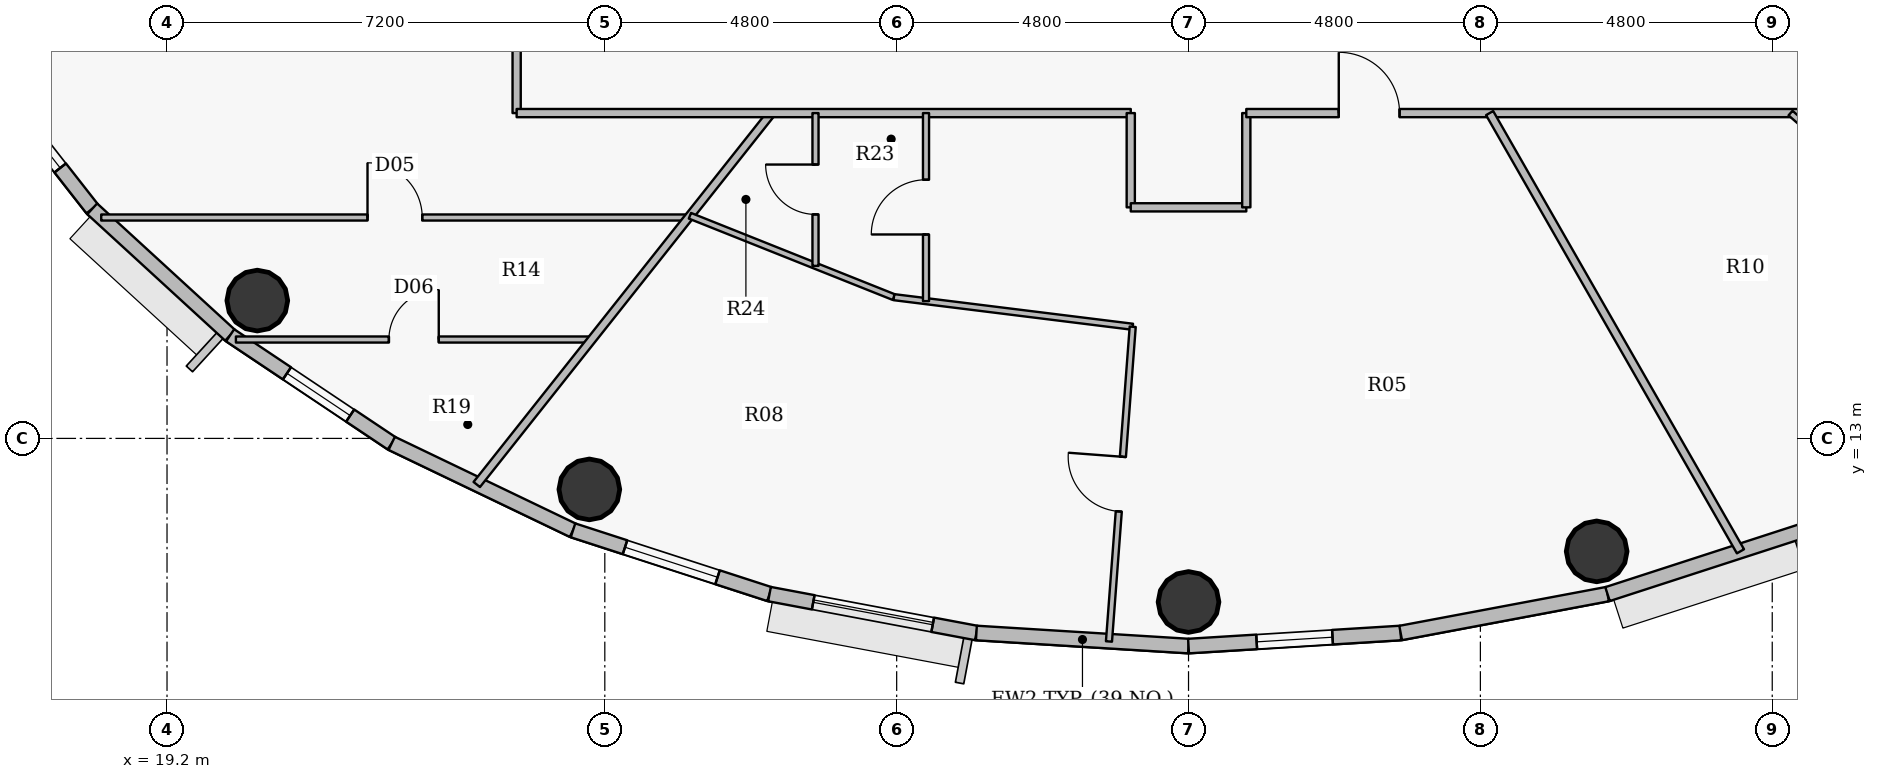
"""IFC4 building model, lengths in metres.
Left out: names, types, materials, properties, quantities, classifications, styles, units other than length and angle.
Written with IfcOpenShell. Run it as: python <this file> out.ifc"""

import sys

from ifc_helpers import new_model, si_unit, direction, frame, frame_2d, origin, origin_2d, place, context, subcontext, project, spatial, rectangle, hollow_circle, extrude, source, transform, mapped, element, fill, save


model = new_model("IFC4")
c1 = context("Model", 3, precision=1e-05, world=origin(), true_north=direction((0.0, 1.0)))
c2 = subcontext(c1, "Body", "Model", "MODEL_VIEW")
j1 = project(units=[si_unit("LENGTHUNIT", "METRE"), si_unit("PLANEANGLEUNIT", "RADIAN")], contexts=[c1])
p1 = place(None, origin())
s1 = spatial("IfcSite", under=j1, at=p1, CompositionType="ELEMENT")
p2 = place(p1, origin())
s2 = spatial("IfcBuilding", under=s1, at=p2, CompositionType="ELEMENT")
p3 = place(p2, frame((0.0, 0.0, 276.75)))
s3 = spatial("IfcBuildingStorey", under=s2, at=p3, CompositionType="ELEMENT", Elevation=276.75)
for number, where, z_axis, x_axis in (
    (1, (20.685, 15.267, 0.0), (0.0, 0.0, 1.0), (1.0, 0.0, 0.0)),
    (2, (26.146, 12.161, 0.0), (0.0, 0.0, 1.0), (1.0, 0.0, 0.0)),
    (3, (36.0, 10.31, 0.0), (0.0, 0.0, 1.0), (1.0, 0.0, 0.0)),
    (4, (42.712, 11.142, 0.0), (0.0, 0.0, 1.0), (1.0, 0.0, 0.0)),
):
    element("IfcColumn", number, at=place(p3, frame(where, z_axis=z_axis, x_axis=x_axis)), inside=s3, PredefinedType="COLUMN", context=c2, shape_type="SweptSolid", body=[
        extrude(hollow_circle(Radius=0.5, WallThickness=0.032, at=origin_2d()), origin(), (0.0, 0.0, 1.0), 3.75),
    ])
p4 = place(p3, frame((17.97, 16.775, 0.0), z_axis=(0.0, 0.0, 1.0), x_axis=(-0.616337186556, 0.787482363275, 0.0)))
e5 = element("IfcWall", 5, at=p4, inside=s3, PredefinedType="SOLIDWALL", context=c2, shape_type="SweptSolid", body=[
    extrude(rectangle(XDim=2.958, YDim=0.24, at=frame_2d((1.479, 0.0))), origin(), (0.0, 0.0, 1.0), 3.5),
])
p5 = place(p4, frame((0.854, 0.0, 0.9)))
e6 = element("IfcOpeningElement", 6, at=p5, cuts=e5, PredefinedType="OPENING", context=c2, shape_type="SweptSolid", body=[
    extrude(rectangle(XDim=1.25, YDim=1.65, at=origin_2d()), frame((0.625, 0.13, 0.825), z_axis=(0.0, -1.0, 0.0), x_axis=(1.0, 0.0, 0.0)), (0.0, 0.0, 1.0), 0.26),
])
p6 = place(p3, frame((20.238, 14.696, 0.0), z_axis=(0.0, 0.0, 1.0), x_axis=(-0.737068506972, 0.675818034703, 0.0)))
e7 = element("IfcWall", 7, at=p6, inside=s3, PredefinedType="SOLIDWALL", context=c2, shape_type="SweptSolid", body=[
    extrude(rectangle(XDim=3.077, YDim=0.24, at=frame_2d((1.539, 0.0))), origin(), (0.0, 0.0, 1.0), 3.5),
])
p7 = place(p3, frame((22.896, 12.918, 0.0), z_axis=(0.0, 0.0, 1.0), x_axis=(-0.831250592635, 0.55589787933, 0.0)))
e8 = element("IfcWall", 8, at=p7, inside=s3, PredefinedType="SOLIDWALL", context=c2, shape_type="SweptSolid", body=[
    extrude(rectangle(XDim=3.197, YDim=0.24, at=frame_2d((1.599, 0.0))), origin(), (0.0, 0.0, 1.0), 3.5),
])
p8 = place(p7, frame((0.822, 0.0, 0.9)))
e9 = element("IfcOpeningElement", 9, at=p8, cuts=e8, PredefinedType="OPENING", context=c2, shape_type="SweptSolid", body=[
    extrude(rectangle(XDim=1.25, YDim=1.65, at=origin_2d()), frame((0.625, 0.13, 0.825), z_axis=(0.0, -1.0, 0.0), x_axis=(1.0, 0.0, 0.0)), (0.0, 0.0, 1.0), 0.26),
])
p9 = place(p3, frame((25.877, 11.488, 0.0), z_axis=(0.0, 0.0, 1.0), x_axis=(-0.901573741254, 0.43262546051, 0.0)))
e10 = element("IfcWall", 10, at=p9, inside=s3, PredefinedType="SOLIDWALL", context=c2, shape_type="SweptSolid", body=[
    extrude(rectangle(XDim=3.307, YDim=0.24, at=frame_2d((1.653, 0.0))), origin(), (0.0, 0.0, 1.0), 3.5),
])
p10 = place(p3, frame((29.109, 10.44, 0.0), z_axis=(0.0, 0.0, 1.0), x_axis=(-0.95123136723, 0.308478339592, 0.0)))
e11 = element("IfcWall", 11, at=p10, inside=s3, PredefinedType="SOLIDWALL", context=c2, shape_type="SweptSolid", body=[
    extrude(rectangle(XDim=3.398, YDim=0.24, at=frame_2d((1.699, 0.0))), origin(), (0.0, 0.0, 1.0), 3.5),
])
p11 = place(p10, frame((0.899, 0.0, 0.9)))
e12 = element("IfcOpeningElement", 12, at=p11, cuts=e11, PredefinedType="OPENING", context=c2, shape_type="SweptSolid", body=[
    extrude(rectangle(XDim=1.6, YDim=1.75, at=origin_2d()), frame((0.8, 0.13, 0.875), z_axis=(0.0, -1.0, 0.0), x_axis=(1.0, 0.0, 0.0)), (0.0, 0.0, 1.0), 0.26),
])
p12 = place(p3, frame((32.511, 9.8, 0.0), z_axis=(0.0, 0.0, 1.0), x_axis=(-0.982782655757, 0.184765395959, 0.0)))
e13 = element("IfcWall", 13, at=p12, inside=s3, PredefinedType="SOLIDWALL", context=c2, shape_type="SweptSolid", body=[
    extrude(rectangle(XDim=3.462, YDim=0.24, at=frame_2d((1.731, 0.0))), origin(), (0.0, 0.0, 1.0), 3.5),
])
p13 = place(p12, frame((0.731, 0.0, 0.9)))
e14 = element("IfcOpeningElement", 14, at=p13, cuts=e13, PredefinedType="OPENING", context=c2, shape_type="SweptSolid", body=[
    extrude(rectangle(XDim=2.0, YDim=1.75, at=origin_2d()), frame((1.0, 0.13, 0.875), z_axis=(0.0, -1.0, 0.0), x_axis=(1.0, 0.0, 0.0)), (0.0, 0.0, 1.0), 0.26),
])
p14 = place(p3, frame((36.0, 9.585, 0.0), z_axis=(0.0, 0.0, 1.0), x_axis=(-0.998104946479, 0.061534671648, 0.0)))
e15 = element("IfcWall", 15, at=p14, inside=s3, PredefinedType="SOLIDWALL", context=c2, shape_type="SweptSolid", body=[
    extrude(rectangle(XDim=3.495, YDim=0.24, at=frame_2d((1.748, 0.0))), origin(), (0.0, 0.0, 1.0), 3.5),
])
p15 = place(p3, frame((39.489, 9.8, 0.0), z_axis=(0.0, 0.0, 1.0), x_axis=(-0.998104946479, -0.061534671648, 0.0)))
e16 = element("IfcWall", 16, at=p15, inside=s3, PredefinedType="SOLIDWALL", context=c2, shape_type="SweptSolid", body=[
    extrude(rectangle(XDim=3.495, YDim=0.24, at=frame_2d((1.748, 0.0))), origin(), (0.0, 0.0, 1.0), 3.5),
])
p16 = place(p15, frame((1.123, 0.0, 0.9)))
e17 = element("IfcOpeningElement", 17, at=p16, cuts=e16, PredefinedType="OPENING", context=c2, shape_type="SweptSolid", body=[
    extrude(rectangle(XDim=1.25, YDim=1.65, at=origin_2d()), frame((0.625, 0.13, 0.825), z_axis=(0.0, -1.0, 0.0), x_axis=(1.0, 0.0, 0.0)), (0.0, 0.0, 1.0), 0.26),
])
p17 = place(p3, frame((42.891, 10.44, 0.0), z_axis=(0.0, 0.0, 1.0), x_axis=(-0.982782655757, -0.184765395959, 0.0)))
e18 = element("IfcWall", 18, at=p17, inside=s3, PredefinedType="SOLIDWALL", context=c2, shape_type="SweptSolid", body=[
    extrude(rectangle(XDim=3.462, YDim=0.24, at=frame_2d((1.731, 0.0))), origin(), (0.0, 0.0, 1.0), 3.5),
])
p18 = place(p3, frame((46.123, 11.488, 0.0), z_axis=(0.0, 0.0, 1.0), x_axis=(-0.95123136723, -0.308478339592, 0.0)))
e19 = element("IfcWall", 19, at=p18, inside=s3, PredefinedType="SOLIDWALL", context=c2, shape_type="SweptSolid", body=[
    extrude(rectangle(XDim=3.398, YDim=0.24, at=frame_2d((1.699, 0.0))), origin(), (0.0, 0.0, 1.0), 3.5),
])
p19 = place(p3, frame((18.118, 16.633, 0.0), z_axis=(0.0, 0.0, 1.0), x_axis=(1.0, 0.0, 0.0)))
e20 = element("IfcWall", 20, at=p19, inside=s3, PredefinedType="PARTITIONING", context=c2, shape_type="SweptSolid", body=[
    extrude(rectangle(XDim=9.659, YDim=0.1, at=frame_2d((4.83, 0.0))), origin(), (0.0, 0.0, 1.0), 2.985),
])
p20 = place(p19, frame((4.379, 0.0, 0.0)))
e21 = element("IfcOpeningElement", 21, at=p20, cuts=e20, PredefinedType="OPENING", context=c2, shape_type="SweptSolid", body=[
    extrude(rectangle(XDim=0.9, YDim=2.1, at=origin_2d()), frame((0.45, 0.06, 1.05), z_axis=(0.0, -1.0, 0.0), x_axis=(1.0, 0.0, 0.0)), (0.0, 0.0, 1.0), 0.12),
])
p21 = place(p3, frame((20.333, 14.626, 0.0), z_axis=(0.0, 0.0, 1.0), x_axis=(1.0, 0.0, 0.0)))
e22 = element("IfcWall", 22, at=p21, inside=s3, PredefinedType="PARTITIONING", context=c2, shape_type="SweptSolid", body=[
    extrude(rectangle(XDim=5.852, YDim=0.1, at=frame_2d((2.926, 0.0))), origin(), (0.0, 0.0, 1.0), 2.985),
])
p22 = place(p21, frame((2.516, 0.0, 0.0)))
e23 = element("IfcOpeningElement", 23, at=p22, cuts=e22, PredefinedType="OPENING", context=c2, shape_type="SweptSolid", body=[
    extrude(rectangle(XDim=0.82, YDim=2.1, at=origin_2d()), frame((0.41, 0.06, 1.05), z_axis=(0.0, -1.0, 0.0), x_axis=(1.0, 0.0, 0.0)), (0.0, 0.0, 1.0), 0.12),
])
p23 = place(p3, frame((24.294, 12.242, 0.0), z_axis=(0.0, 0.0, 1.0), x_axis=(0.621439784824, 0.783461928774, 0.0)))
e24 = element("IfcWall", 24, at=p23, inside=s3, PredefinedType="PARTITIONING", context=c2, shape_type="SweptSolid", body=[
    extrude(rectangle(XDim=7.796, YDim=0.135, at=frame_2d((3.898, 0.0))), origin(), (0.0, 0.0, 1.0), 2.985),
])
p24 = place(p3, frame((24.95, 18.35, 0.0), z_axis=(0.0, 0.0, 1.0), x_axis=(0.0, 1.0, 0.0)))
e25 = element("IfcWall", 25, at=p24, inside=s3, PredefinedType="PARTITIONING", context=c2, shape_type="SweptSolid", body=[
    extrude(rectangle(XDim=17.3, YDim=0.135, at=frame_2d((8.65, 0.0))), origin(), (0.0, 0.0, 1.0), 3.035),
])
p25 = place(p24, frame((5.495, 0.0, 0.0)))
e26 = element("IfcOpeningElement", 26, at=p25, cuts=e25, PredefinedType="OPENING", context=c2, shape_type="SweptSolid", body=[
    extrude(rectangle(XDim=1.0, YDim=2.15, at=origin_2d()), frame((0.5, 0.078, 1.075), z_axis=(0.0, -1.0, 0.0), x_axis=(1.0, 0.0, 0.0)), (0.0, 0.0, 1.0), 0.155),
])
p26 = place(p3, frame((24.95, 18.35, 0.0), z_axis=(0.0, 0.0, 1.0), x_axis=(1.0, 0.0, 0.0)))
e27 = element("IfcWall", 27, at=p26, inside=s3, PredefinedType="PARTITIONING", context=c2, shape_type="SweptSolid", body=[
    extrude(rectangle(XDim=10.1, YDim=0.135, at=frame_2d((5.05, 0.0))), origin(), (0.0, 0.0, 1.0), 3.035),
])
p27 = place(p3, frame((27.8, 16.662, 0.0), z_axis=(0.0, 0.0, 1.0), x_axis=(0.928783988526, -0.370621508628, 0.0)))
e28 = element("IfcWall", 28, at=p27, inside=s3, PredefinedType="PARTITIONING", context=c2, shape_type="SweptSolid", body=[
    extrude(rectangle(XDim=3.613, YDim=0.1, at=frame_2d((1.806, 0.0))), origin(), (0.0, 0.0, 1.0), 3.035),
])
p28 = place(p3, frame((29.865, 15.837, 0.0), z_axis=(0.0, 0.0, 1.0), x_axis=(0.0, 1.0, 0.0)))
e29 = element("IfcWall", 29, at=p28, inside=s3, PredefinedType="PARTITIONING", context=c2, shape_type="SweptSolid", body=[
    extrude(rectangle(XDim=2.513, YDim=0.1, at=frame_2d((1.256, 0.0))), origin(), (0.0, 0.0, 1.0), 3.035),
])
p29 = place(p28, frame((0.846, 0.0, 0.0)))
e30 = element("IfcOpeningElement", 30, at=p29, cuts=e29, PredefinedType="OPENING", context=c2, shape_type="SweptSolid", body=[
    extrude(rectangle(XDim=0.82, YDim=2.1, at=origin_2d()), frame((0.41, 0.06, 1.05), z_axis=(0.0, -1.0, 0.0), x_axis=(1.0, 0.0, 0.0)), (0.0, 0.0, 1.0), 0.12),
])
p30 = place(p3, frame((31.155, 15.323, 0.0), z_axis=(0.0, 0.0, 1.0), x_axis=(0.992397939869, -0.123070422704, 0.0)))
e31 = element("IfcWall", 31, at=p30, inside=s3, PredefinedType="PARTITIONING", context=c2, shape_type="SweptSolid", body=[
    extrude(rectangle(XDim=3.958, YDim=0.1, at=frame_2d((1.979, 0.0))), origin(), (0.0, 0.0, 1.0), 3.5),
])
p31 = place(p3, frame((31.683, 15.258, 0.0), z_axis=(0.0, 0.0, 1.0), x_axis=(0.0, 1.0, 0.0)))
e32 = element("IfcWall", 32, at=p31, inside=s3, PredefinedType="PARTITIONING", context=c2, shape_type="SweptSolid", body=[
    extrude(rectangle(XDim=3.093, YDim=0.1, at=frame_2d((1.546, 0.0))), origin(), (0.0, 0.0, 1.0), 3.5),
])
p32 = place(p31, frame((1.096, 0.0, 0.0)))
e33 = element("IfcOpeningElement", 33, at=p32, cuts=e32, PredefinedType="OPENING", context=c2, shape_type="SweptSolid", body=[
    extrude(rectangle(XDim=0.9, YDim=2.1, at=origin_2d()), frame((0.45, 0.06, 1.05), z_axis=(0.0, -1.0, 0.0), x_axis=(1.0, 0.0, 0.0)), (0.0, 0.0, 1.0), 0.12),
])
p33 = place(p3, frame((34.691, 9.661, 0.0), z_axis=(0.0, 0.0, 1.0), x_axis=(0.0752647297, 0.997163587614, 0.0)))
e34 = element("IfcWall", 34, at=p33, inside=s3, PredefinedType="PARTITIONING", context=c2, shape_type="SweptSolid", body=[
    extrude(rectangle(XDim=5.19, YDim=0.1, at=frame_2d((2.595, 0.0))), origin(), (0.0, 0.0, 1.0), 2.985),
])
p34 = place(p33, frame((2.145, 0.0, 0.0)))
e35 = element("IfcOpeningElement", 35, at=p34, cuts=e34, PredefinedType="OPENING", context=c2, shape_type="SweptSolid", body=[
    extrude(rectangle(XDim=0.9, YDim=2.1, at=origin_2d()), frame((0.45, 0.06, 1.05), z_axis=(0.0, -1.0, 0.0), x_axis=(1.0, 0.0, 0.0)), (0.0, 0.0, 1.0), 0.12),
])
p35 = place(p3, frame((35.05, 16.8, 0.0), z_axis=(0.0, 0.0, 1.0), x_axis=(0.0, 1.0, 0.0)))
e36 = element("IfcWall", 36, at=p35, inside=s3, PredefinedType="PARTITIONING", context=c2, shape_type="SweptSolid", body=[
    extrude(rectangle(XDim=1.55, YDim=0.135, at=frame_2d((0.775, 0.0))), origin(), (0.0, 0.0, 1.0), 3.5),
])
p36 = place(p3, frame((35.05, 16.8, 0.0), z_axis=(0.0, 0.0, 1.0), x_axis=(1.0, 0.0, 0.0)))
e37 = element("IfcWall", 37, at=p36, inside=s3, PredefinedType="PARTITIONING", context=c2, shape_type="SweptSolid", body=[
    extrude(rectangle(XDim=1.9, YDim=0.135, at=frame_2d((0.95, 0.0))), origin(), (0.0, 0.0, 1.0), 3.035),
])
p37 = place(p3, frame((36.95, 16.8, 0.0), z_axis=(0.0, 0.0, 1.0), x_axis=(0.0, 1.0, 0.0)))
e38 = element("IfcWall", 38, at=p37, inside=s3, PredefinedType="PARTITIONING", context=c2, shape_type="SweptSolid", body=[
    extrude(rectangle(XDim=1.55, YDim=0.135, at=frame_2d((0.775, 0.0))), origin(), (0.0, 0.0, 1.0), 3.5),
])
p38 = place(p3, frame((36.95, 18.35, 0.0), z_axis=(0.0, 0.0, 1.0), x_axis=(1.0, 0.0, 0.0)))
e39 = element("IfcWall", 39, at=p38, inside=s3, PredefinedType="PARTITIONING", context=c2, shape_type="SweptSolid", body=[
    extrude(rectangle(XDim=10.1, YDim=0.135, at=frame_2d((5.05, 0.0))), origin(), (0.0, 0.0, 1.0), 3.035),
])
p39 = place(p38, frame((1.521, 0.0, 0.0)))
e40 = element("IfcOpeningElement", 40, at=p39, cuts=e39, PredefinedType="OPENING", context=c2, shape_type="SweptSolid", body=[
    extrude(rectangle(XDim=1.0, YDim=2.15, at=origin_2d()), frame((0.5, 0.078, 1.075), z_axis=(0.0, -1.0, 0.0), x_axis=(1.0, 0.0, 0.0)), (0.0, 0.0, 1.0), 0.155),
])
p40 = place(p3, frame((40.952, 18.35, 0.0), z_axis=(0.0, 0.0, 1.0), x_axis=(0.496803688517, -0.867862947173, 0.0)))
e41 = element("IfcWall", 41, at=p40, inside=s3, PredefinedType="PARTITIONING", context=c2, shape_type="SweptSolid", body=[
    extrude(rectangle(XDim=8.304, YDim=0.135, at=frame_2d((4.152, 0.0))), origin(), (0.0, 0.0, 1.0), 2.985),
])
p41 = place(p3, frame((45.901, 18.35, 0.0), z_axis=(0.0, 0.0, 1.0), x_axis=(0.753056223084, -0.657956172457, 0.0)))
e42 = element("IfcWall", 42, at=p41, inside=s3, PredefinedType="PARTITIONING", context=c2, shape_type="SweptSolid", body=[
    extrude(rectangle(XDim=6.526, YDim=0.1, at=frame_2d((3.263, 0.0))), origin(), (0.0, 0.0, 1.0), 2.985),
])
p42 = place(p41, frame((2.813, 0.0, 0.0)))
e43 = element("IfcOpeningElement", 43, at=p42, cuts=e42, PredefinedType="OPENING", context=c2, shape_type="SweptSolid", body=[
    extrude(rectangle(XDim=0.9, YDim=2.1, at=origin_2d()), frame((0.45, 0.06, 1.05), z_axis=(0.0, -1.0, 0.0), x_axis=(1.0, 0.0, 0.0)), (0.0, 0.0, 1.0), 0.12),
])
m1 = source(origin(), c2, "Body", "SweptSolid", [
    extrude(rectangle(XDim=1.25, YDim=1.65, at=origin_2d()), frame((0.625, 0.03, 0.825), z_axis=(0.0, -1.0, 0.0), x_axis=(1.0, 0.0, 0.0)), (0.0, 0.0, 1.0), 0.06),
])
p43 = place(p5, origin())
e44 = element("IfcWindow", 44, at=p43, inside=s3, PartitioningType="SINGLE_PANEL", PredefinedType="WINDOW", context=c2, shape_type="MappedRepresentation", body=[
    mapped(m1, transform((0.0, 0.0, 0.0), x_axis=(1.0, 0.0, 0.0), y_axis=(0.0, 1.0, 0.0), z_axis=(0.0, 0.0, 1.0), scale=1.0)),
])
fill(e6, e44)
p44 = place(p8, origin())
e45 = element("IfcWindow", 45, at=p44, inside=s3, PartitioningType="SINGLE_PANEL", PredefinedType="WINDOW", context=c2, shape_type="MappedRepresentation", body=[
    mapped(m1, transform((0.0, 0.0, 0.0), x_axis=(1.0, 0.0, 0.0), y_axis=(0.0, 1.0, 0.0), z_axis=(0.0, 0.0, 1.0), scale=1.0)),
])
fill(e9, e45)
m2 = source(origin(), c2, "Body", "SweptSolid", [
    extrude(rectangle(XDim=1.6, YDim=1.75, at=origin_2d()), frame((0.8, 0.03, 0.875), z_axis=(0.0, -1.0, 0.0), x_axis=(1.0, 0.0, 0.0)), (0.0, 0.0, 1.0), 0.06),
])
p45 = place(p11, origin())
e46 = element("IfcWindow", 46, at=p45, inside=s3, PartitioningType="DOUBLE_PANEL_VERTICAL", PredefinedType="WINDOW", context=c2, shape_type="MappedRepresentation", body=[
    mapped(m2, transform((0.0, 0.0, 0.0), x_axis=(1.0, 0.0, 0.0), y_axis=(0.0, 1.0, 0.0), z_axis=(0.0, 0.0, 1.0), scale=1.0)),
])
fill(e12, e46)
m3 = source(origin(), c2, "Body", "SweptSolid", [
    extrude(rectangle(XDim=2.0, YDim=1.75, at=origin_2d()), frame((1.0, 0.03, 0.875), z_axis=(0.0, -1.0, 0.0), x_axis=(1.0, 0.0, 0.0)), (0.0, 0.0, 1.0), 0.06),
])
p46 = place(p13, origin())
e47 = element("IfcWindow", 47, at=p46, inside=s3, PartitioningType="DOUBLE_PANEL_VERTICAL", PredefinedType="WINDOW", context=c2, shape_type="MappedRepresentation", body=[
    mapped(m3, transform((0.0, 0.0, 0.0), x_axis=(1.0, 0.0, 0.0), y_axis=(0.0, 1.0, 0.0), z_axis=(0.0, 0.0, 1.0), scale=1.0)),
])
fill(e14, e47)
p47 = place(p16, origin())
e48 = element("IfcWindow", 48, at=p47, inside=s3, PartitioningType="SINGLE_PANEL", PredefinedType="WINDOW", context=c2, shape_type="MappedRepresentation", body=[
    mapped(m1, transform((0.0, 0.0, 0.0), x_axis=(1.0, 0.0, 0.0), y_axis=(0.0, 1.0, 0.0), z_axis=(0.0, 0.0, 1.0), scale=1.0)),
])
fill(e17, e48)
m4 = source(origin(), c2, "Body", "SweptSolid", [
    extrude(rectangle(XDim=0.9, YDim=2.1, at=origin_2d()), frame((0.45, 0.025, 1.05), z_axis=(0.0, -1.0, 0.0), x_axis=(1.0, 0.0, 0.0)), (0.0, 0.0, 1.0), 0.05),
])
p48 = place(p20, origin())
e49 = element("IfcDoor", 49, at=p48, inside=s3, OperationType="SINGLE_SWING_LEFT", PredefinedType="DOOR", context=c2, shape_type="MappedRepresentation", body=[
    mapped(m4, transform((0.0, 0.0, 0.0), x_axis=(1.0, 0.0, 0.0), y_axis=(0.0, 1.0, 0.0), z_axis=(0.0, 0.0, 1.0), scale=1.0)),
])
fill(e21, e49)
m5 = source(origin(), c2, "Body", "SweptSolid", [
    extrude(rectangle(XDim=0.82, YDim=2.1, at=origin_2d()), frame((0.41, 0.025, 1.05), z_axis=(0.0, -1.0, 0.0), x_axis=(1.0, 0.0, 0.0)), (0.0, 0.0, 1.0), 0.05),
])
p49 = place(p22, origin())
e50 = element("IfcDoor", 50, at=p49, inside=s3, OperationType="SINGLE_SWING_RIGHT", PredefinedType="DOOR", context=c2, shape_type="MappedRepresentation", body=[
    mapped(m5, transform((0.0, 0.0, 0.0), x_axis=(1.0, 0.0, 0.0), y_axis=(0.0, 1.0, 0.0), z_axis=(0.0, 0.0, 1.0), scale=1.0)),
])
fill(e23, e50)
m6 = source(origin(), c2, "Body", "SweptSolid", [
    extrude(rectangle(XDim=1.0, YDim=2.15, at=origin_2d()), frame((0.5, 0.025, 1.075), z_axis=(0.0, -1.0, 0.0), x_axis=(1.0, 0.0, 0.0)), (0.0, 0.0, 1.0), 0.05),
])
p50 = place(p39, origin())
e51 = element("IfcDoor", 51, at=p50, inside=s3, OperationType="SINGLE_SWING_LEFT", PredefinedType="DOOR", context=c2, shape_type="MappedRepresentation", body=[
    mapped(m6, transform((0.0, 0.0, 0.0), x_axis=(1.0, 0.0, 0.0), y_axis=(0.0, 1.0, 0.0), z_axis=(0.0, 0.0, 1.0), scale=1.0)),
])
fill(e40, e51)
p51 = place(p34, origin())
e52 = element("IfcDoor", 52, at=p51, inside=s3, OperationType="SINGLE_SWING_RIGHT", PredefinedType="DOOR", context=c2, shape_type="MappedRepresentation", body=[
    mapped(m4, transform((0.0, 0.0, 0.0), x_axis=(1.0, 0.0, 0.0), y_axis=(0.0, 1.0, 0.0), z_axis=(0.0, 0.0, 1.0), scale=1.0)),
])
fill(e35, e52)
p52 = place(p32, origin())
e53 = element("IfcDoor", 53, at=p52, inside=s3, OperationType="SINGLE_SWING_LEFT", PredefinedType="DOOR", context=c2, shape_type="MappedRepresentation", body=[
    mapped(m4, transform((0.0, 0.0, 0.0), x_axis=(1.0, 0.0, 0.0), y_axis=(0.0, 1.0, 0.0), z_axis=(0.0, 0.0, 1.0), scale=1.0)),
])
fill(e33, e53)
p53 = place(p29, origin())
e54 = element("IfcDoor", 54, at=p53, inside=s3, OperationType="SINGLE_SWING_RIGHT", PredefinedType="DOOR", context=c2, shape_type="MappedRepresentation", body=[
    mapped(m5, transform((0.0, 0.0, 0.0), x_axis=(1.0, 0.0, 0.0), y_axis=(0.0, 1.0, 0.0), z_axis=(0.0, 0.0, 1.0), scale=1.0)),
])
fill(e30, e54)
save(model, sys.argv[1])
